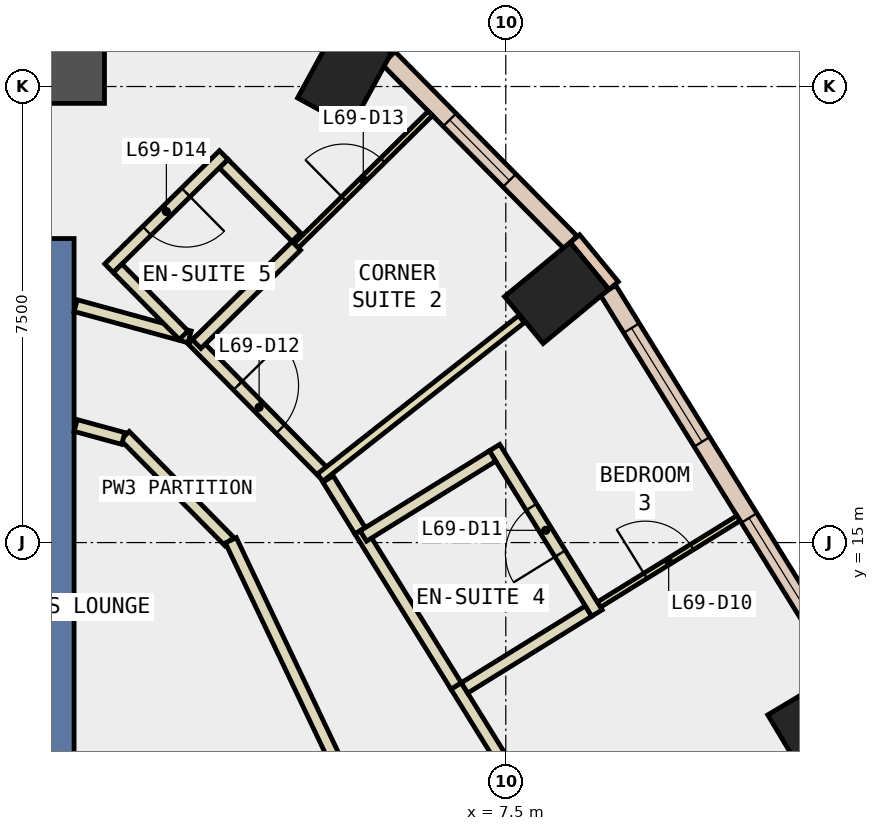
"""IFC4 building model, lengths in metres.
Left out: names, types, materials, properties, quantities, classifications, styles, units other than length and angle.
Written with IfcOpenShell. Run it as: python <this file> out.ifc"""

import sys

from ifc_helpers import new_model, si_unit, direction, frame, frame_2d, origin, origin_2d, place, context, subcontext, project, spatial, rectangle, extrude, element, fill, save


model = new_model("IFC4")
c1 = context("Model", 3, precision=1e-05, world=origin(), true_north=direction((0.0, 1.0)))
c2 = subcontext(c1, "Body", "Model", "MODEL_VIEW")
j1 = project(units=[si_unit("LENGTHUNIT", "METRE"), si_unit("PLANEANGLEUNIT", "RADIAN")], contexts=[c1])
p1 = place(None, origin())
s1 = spatial("IfcSite", under=j1, at=p1, CompositionType="ELEMENT")
p2 = place(p1, origin())
s2 = spatial("IfcBuilding", under=s1, at=p2, CompositionType="ELEMENT")
p3 = place(p2, frame((0.0, 0.0, 297.2)))
s3 = spatial("IfcBuildingStorey", under=s2, at=p3, CompositionType="ELEMENT", Elevation=297.2)
for number, where, z_axis, x_axis in (
    (1, (12.666, 12.097, -0.34), (0.0, 0.0, 1.0), (-0.514, 0.858, 0.0)),
    (2, (8.337, 19.105, -0.34), (0.0, 0.0, 1.0), (-0.636, 0.772, 0.0)),
    (3, (4.85, 22.687, -0.34), (0.0, 0.0, 1.0), (-0.878, 0.479, 0.0)),
):
    element("IfcColumn", number, at=place(p3, frame(where, z_axis=z_axis, x_axis=x_axis)), inside=s3, PredefinedType="COLUMN", context=c2, shape_type="SweptSolid", body=[
        extrude(rectangle(XDim=1.0, YDim=1.4, at=origin_2d()), origin(), (0.0, 0.0, 1.0), 3.6),
    ])
p4 = place(p3, frame((0.0, 23.123, -0.34), z_axis=(0.0, 0.0, 1.0), x_axis=(0.0, 1.0, 0.0)))
e4 = element("IfcColumn", 4, at=p4, inside=s3, PredefinedType="COLUMN", context=c2, shape_type="SweptSolid", body=[
    extrude(rectangle(XDim=1.8, YDim=1.8, at=origin_2d()), origin(), (0.0, 0.0, 1.0), 3.6),
])
p5 = place(p3, frame((0.0, 11.0, -0.34), z_axis=(0.0, 0.0, 1.0), x_axis=(0.0, 1.0, 0.0)))
e5 = element("IfcWall", 5, at=p5, inside=s3, PredefinedType="SHEAR", context=c2, shape_type="SweptSolid", body=[
    extrude(rectangle(XDim=9.0, YDim=0.8, at=frame_2d((4.5, 0.0))), origin(), (0.0, 0.0, 1.0), 3.6),
])
p6 = place(p3, frame((9.273, 19.227, 0.0), z_axis=(0.0, 0.0, 1.0), x_axis=(-0.635852688617, 0.771810441999, 0.0)))
e6 = element("IfcWall", 6, at=p6, inside=s3, PredefinedType="STANDARD", context=c2, shape_type="SweptSolid", body=[
    extrude(rectangle(XDim=1.0, YDim=0.2, at=frame_2d((0.5, 0.0))), origin(), (0.0, 0.0, 1.0), 3.26),
])
p7 = place(p3, frame((13.047, 12.907, 0.0), z_axis=(0.0, 0.0, 1.0), x_axis=(-0.526409529565, 0.850231149267, 0.0)))
e7 = element("IfcWall", 7, at=p7, inside=s3, PredefinedType="STANDARD", context=c2, shape_type="SweptSolid", body=[
    extrude(rectangle(XDim=7.346, YDim=0.3, at=frame_2d((3.673, 0.0))), origin(), (0.0, 0.0, 1.0), 3.26),
])
p8 = place(p7, frame((0.737, 0.0, 0.9)))
e8 = element("IfcOpeningElement", 8, at=p8, cuts=e7, PredefinedType="OPENING", context=c2, shape_type="SweptSolid", body=[
    extrude(rectangle(XDim=2.2, YDim=2.0, at=frame_2d((1.1, 1.0))), frame((0.0, 0.16, 0.0), z_axis=(0.0, -1.0, 0.0), x_axis=(1.0, 0.0, 0.0)), (0.0, 0.0, 1.0), 0.32),
])
p9 = place(p7, frame((4.41, 0.0, 0.9)))
e9 = element("IfcOpeningElement", 9, at=p9, cuts=e7, PredefinedType="OPENING", context=c2, shape_type="SweptSolid", body=[
    extrude(rectangle(XDim=2.2, YDim=2.0, at=frame_2d((1.1, 1.0))), frame((0.0, 0.16, 0.0), z_axis=(0.0, -1.0, 0.0), x_axis=(1.0, 0.0, 0.0)), (0.0, 0.0, 1.0), 0.32),
])
p10 = place(p3, frame((8.564, 19.938, 0.0), z_axis=(0.0, 0.0, 1.0), x_axis=(-0.70250598769, 0.711677832491, 0.0)))
e10 = element("IfcWall", 10, at=p10, inside=s3, PredefinedType="STANDARD", context=c2, shape_type="SweptSolid", body=[
    extrude(rectangle(XDim=4.259, YDim=0.3, at=frame_2d((2.129, 0.0))), origin(), (0.0, 0.0, 1.0), 3.26),
])
p11 = place(p10, frame((1.429, 0.0, 0.9)))
e11 = element("IfcOpeningElement", 11, at=p11, cuts=e10, PredefinedType="OPENING", context=c2, shape_type="SweptSolid", body=[
    extrude(rectangle(XDim=1.4, YDim=2.0, at=frame_2d((0.7, 1.0))), frame((0.0, 0.16, 0.0), z_axis=(0.0, -1.0, 0.0), x_axis=(1.0, 0.0, 0.0)), (0.0, 0.0, 1.0), 0.32),
])
p12 = place(p3, frame((2.951, 15.019, 0.0), z_axis=(0.0, 0.0, 1.0), x_axis=(-0.702341227034, 0.711840432126, 0.0)))
e12 = element("IfcWall", 12, at=p12, inside=s3, PredefinedType="PARTITIONING", context=c2, shape_type="SweptSolid", body=[
    extrude(rectangle(XDim=2.442, YDim=0.2, at=frame_2d((1.221, 0.0))), origin(), (0.0, 0.0, 1.0), 3.26),
])
p13 = place(p3, frame((1.209, 16.712, 0.0), z_axis=(0.0, 0.0, 1.0), x_axis=(-0.964583129746, 0.26377904733, 0.0)))
e13 = element("IfcWall", 13, at=p13, inside=s3, PredefinedType="PARTITIONING", context=c2, shape_type="SweptSolid", body=[
    extrude(rectangle(XDim=0.812, YDim=0.2, at=frame_2d((0.406, 0.0))), origin(), (0.0, 0.0, 1.0), 3.26),
])
p14 = place(p3, frame((6.683, 12.642, 0.0), z_axis=(0.0, 0.0, 1.0), x_axis=(0.526290465295, -0.850304854825, 0.0)))
e14 = element("IfcWall", 14, at=p14, inside=s3, PredefinedType="PARTITIONING", context=c2, shape_type="SweptSolid", body=[
    extrude(rectangle(XDim=3.538, YDim=0.2, at=frame_2d((1.769, 0.0))), origin(), (0.0, 0.0, 1.0), 3.26),
])
p15 = place(p3, frame((4.577, 16.045, 0.0), z_axis=(0.0, 0.0, 1.0), x_axis=(0.526203576349, -0.850358628014, 0.0)))
e15 = element("IfcWall", 15, at=p15, inside=s3, PredefinedType="PARTITIONING", context=c2, shape_type="SweptSolid", body=[
    extrude(rectangle(XDim=1.002, YDim=0.2, at=frame_2d((0.501, 0.0))), origin(), (0.0, 0.0, 1.0), 3.26),
])
p16 = place(p3, frame((5.104, 15.193, 0.0), z_axis=(0.0, 0.0, 1.0), x_axis=(0.526329401671, -0.850280754184, 0.0)))
e16 = element("IfcWall", 16, at=p16, inside=s3, PredefinedType="PARTITIONING", context=c2, shape_type="SweptSolid", body=[
    extrude(rectangle(XDim=3.0, YDim=0.2, at=frame_2d((1.5, 0.0))), origin(), (0.0, 0.0, 1.0), 3.26),
])
p17 = place(p3, frame((2.346, 18.336, 0.0), z_axis=(0.0, 0.0, 1.0), x_axis=(0.702481985573, -0.711701524479, 0.0)))
e17 = element("IfcWall", 17, at=p17, inside=s3, PredefinedType="PARTITIONING", context=c2, shape_type="SweptSolid", body=[
    extrude(rectangle(XDim=3.125, YDim=0.2, at=frame_2d((1.562, 0.0))), origin(), (0.0, 0.0, 1.0), 3.26),
])
p18 = place(p17, frame((1.062, 0.0, 0.0)))
e18 = element("IfcOpeningElement", 18, at=p18, cuts=e17, PredefinedType="OPENING", context=c2, shape_type="SweptSolid", body=[
    extrude(rectangle(XDim=1.0, YDim=2.1, at=frame_2d((0.5, 1.05))), frame((0.0, 0.11, 0.0), z_axis=(0.0, -1.0, 0.0), x_axis=(1.0, 0.0, 0.0)), (0.0, 0.0, 1.0), 0.22),
])
p19 = place(p3, frame((0.426, 18.896, 0.0), z_axis=(0.0, 0.0, 1.0), x_axis=(0.964522741234, -0.263999775838, 0.0)))
e19 = element("IfcWall", 19, at=p19, inside=s3, PredefinedType="PARTITIONING", context=c2, shape_type="SweptSolid", body=[
    extrude(rectangle(XDim=1.943, YDim=0.2, at=frame_2d((0.971, 0.0))), origin(), (0.0, 0.0, 1.0), 3.26),
])
p20 = place(p3, frame((9.031, 13.979, 0.0), z_axis=(0.0, 0.0, 1.0), x_axis=(0.85032680557, 0.526254998768, 0.0)))
e20 = element("IfcWall", 20, at=p20, inside=s3, PredefinedType="PARTITIONING", context=c2, shape_type="SweptSolid", body=[
    extrude(rectangle(XDim=2.7, YDim=0.1, at=frame_2d((1.35, 0.0))), origin(), (0.0, 0.0, 1.0), 3.26),
])
p21 = place(p20, frame((0.9, 0.0, 0.0)))
e21 = element("IfcOpeningElement", 21, at=p21, cuts=e20, PredefinedType="OPENING", context=c2, shape_type="SweptSolid", body=[
    extrude(rectangle(XDim=0.9, YDim=2.1, at=frame_2d((0.45, 1.05))), frame((0.0, 0.06, 0.0), z_axis=(0.0, -1.0, 0.0), x_axis=(1.0, 0.0, 0.0)), (0.0, 0.0, 1.0), 0.12),
])
p22 = place(p3, frame((6.821, 12.61, 0.0), z_axis=(0.0, 0.0, 1.0), x_axis=(0.850254303895, 0.526372129494, 0.0)))
e22 = element("IfcWall", 22, at=p22, inside=s3, PredefinedType="PARTITIONING", context=c2, shape_type="SweptSolid", body=[
    extrude(rectangle(XDim=2.399, YDim=0.2, at=frame_2d((1.2, 0.0))), origin(), (0.0, 0.0, 1.0), 3.26),
])
p23 = place(p3, frame((8.999, 13.841, 0.0), z_axis=(0.0, 0.0, 1.0), x_axis=(-0.526283695852, 0.850309044689, 0.0)))
e23 = element("IfcWall", 23, at=p23, inside=s3, PredefinedType="PARTITIONING", context=c2, shape_type="SweptSolid", body=[
    extrude(rectangle(XDim=3.2, YDim=0.2, at=frame_2d((1.6, 0.0))), origin(), (0.0, 0.0, 1.0), 3.26),
])
p24 = place(p23, frame((1.15, 0.0, 0.0)))
e24 = element("IfcOpeningElement", 24, at=p24, cuts=e23, PredefinedType="OPENING", context=c2, shape_type="SweptSolid", body=[
    extrude(rectangle(XDim=0.9, YDim=2.1, at=frame_2d((0.45, 1.05))), frame((0.0, 0.11, 0.0), z_axis=(0.0, -1.0, 0.0), x_axis=(1.0, 0.0, 0.0)), (0.0, 0.0, 1.0), 0.22),
])
p25 = place(p3, frame((7.282, 16.424, 0.0), z_axis=(0.0, 0.0, 1.0), x_axis=(-0.850142312258, -0.526552987751, 0.0)))
e25 = element("IfcWall", 25, at=p25, inside=s3, PredefinedType="PARTITIONING", context=c2, shape_type="SweptSolid", body=[
    extrude(rectangle(XDim=2.5, YDim=0.2, at=frame_2d((1.25, 0.0))), origin(), (0.0, 0.0, 1.0), 3.26),
])
p26 = place(p3, frame((4.445, 16.068, 0.0), z_axis=(0.0, 0.0, 1.0), x_axis=(0.785872006963, 0.618389188677, 0.0)))
e26 = element("IfcWall", 26, at=p26, inside=s3, PredefinedType="PARTITIONING", context=c2, shape_type="SweptSolid", body=[
    extrude(rectangle(XDim=4.216, YDim=0.15, at=frame_2d((2.108, 0.0))), origin(), (0.0, 0.0, 1.0), 3.26),
])
p27 = place(p3, frame((4.053, 19.881, 0.0), z_axis=(0.0, 0.0, 1.0), x_axis=(0.711776071152, 0.702406452516, 0.0)))
e27 = element("IfcWall", 27, at=p27, inside=s3, PredefinedType="PARTITIONING", context=c2, shape_type="SweptSolid", body=[
    extrude(rectangle(XDim=3.101, YDim=0.1, at=frame_2d((1.55, 0.0))), origin(), (0.0, 0.0, 1.0), 3.26),
])
p28 = place(p27, frame((1.1, 0.0, 0.0)))
e28 = element("IfcOpeningElement", 28, at=p28, cuts=e27, PredefinedType="OPENING", context=c2, shape_type="SweptSolid", body=[
    extrude(rectangle(XDim=0.9, YDim=2.1, at=frame_2d((0.45, 1.05))), frame((0.0, 0.06, 0.0), z_axis=(0.0, -1.0, 0.0), x_axis=(1.0, 0.0, 0.0)), (0.0, 0.0, 1.0), 0.12),
])
p29 = place(p3, frame((2.416, 18.265, 0.0), z_axis=(0.0, 0.0, 1.0), x_axis=(0.71207765541, 0.702100714047, 0.0)))
e29 = element("IfcWall", 29, at=p29, inside=s3, PredefinedType="PARTITIONING", context=c2, shape_type="SweptSolid", body=[
    extrude(rectangle(XDim=2.3, YDim=0.2, at=frame_2d((1.15, 0.0))), origin(), (0.0, 0.0, 1.0), 3.26),
])
p30 = place(p3, frame((4.054, 20.022, 0.0), z_axis=(0.0, 0.0, 1.0), x_axis=(-0.702351102688, 0.711830688123, 0.0)))
e30 = element("IfcWall", 30, at=p30, inside=s3, PredefinedType="PARTITIONING", context=c2, shape_type="SweptSolid", body=[
    extrude(rectangle(XDim=1.7, YDim=0.2, at=frame_2d((0.85, 0.0))), origin(), (0.0, 0.0, 1.0), 3.26),
])
p31 = place(p3, frame((2.861, 21.374, 0.0), z_axis=(0.0, 0.0, 1.0), x_axis=(-0.711606122075, -0.702578626934, 0.0)))
e31 = element("IfcWall", 31, at=p31, inside=s3, PredefinedType="PARTITIONING", context=c2, shape_type="SweptSolid", body=[
    extrude(rectangle(XDim=2.65, YDim=0.2, at=frame_2d((1.325, 0.0))), origin(), (0.0, 0.0, 1.0), 3.26),
])
p32 = place(p31, frame((0.875, 0.0, 0.0)))
e32 = element("IfcOpeningElement", 32, at=p32, cuts=e31, PredefinedType="OPENING", context=c2, shape_type="SweptSolid", body=[
    extrude(rectangle(XDim=0.9, YDim=2.1, at=frame_2d((0.45, 1.05))), frame((0.0, 0.11, 0.0), z_axis=(0.0, -1.0, 0.0), x_axis=(1.0, 0.0, 0.0)), (0.0, 0.0, 1.0), 0.22),
])
p33 = place(p3, frame((1.116, 19.511, 0.0), z_axis=(0.0, 0.0, 1.0), x_axis=(0.702515837086, -0.711668109896, 0.0)))
e33 = element("IfcWall", 33, at=p33, inside=s3, PredefinedType="PARTITIONING", context=c2, shape_type="SweptSolid", body=[
    extrude(rectangle(XDim=1.547, YDim=0.2, at=frame_2d((0.773, 0.0))), origin(), (0.0, 0.0, 1.0), 3.26),
])
p34 = place(p3, frame((4.822, 11.156, 0.0), z_axis=(0.0, 0.0, 1.0), x_axis=(-0.429057973289, 0.903276953961, 0.0)))
e34 = element("IfcWall", 34, at=p34, inside=s3, PredefinedType="PARTITIONING", context=c2, shape_type="SweptSolid", body=[
    extrude(rectangle(XDim=4.298, YDim=0.2, at=frame_2d((2.149, 0.0))), origin(), (0.0, 0.0, 1.0), 3.26),
])
p35 = place(p8, origin())
e35 = element("IfcWindow", 35, at=p35, inside=s3, PartitioningType="SINGLE_PANEL", PredefinedType="WINDOW", context=c2, shape_type="SweptSolid", body=[
    extrude(rectangle(XDim=2.2, YDim=2.0, at=frame_2d((1.1, 1.0))), frame((0.0, 0.03, 0.0), z_axis=(0.0, -1.0, 0.0), x_axis=(1.0, 0.0, 0.0)), (0.0, 0.0, 1.0), 0.06),
])
fill(e8, e35)
p36 = place(p9, origin())
e36 = element("IfcWindow", 36, at=p36, inside=s3, PartitioningType="SINGLE_PANEL", PredefinedType="WINDOW", context=c2, shape_type="SweptSolid", body=[
    extrude(rectangle(XDim=2.2, YDim=2.0, at=frame_2d((1.1, 1.0))), frame((0.0, 0.03, 0.0), z_axis=(0.0, -1.0, 0.0), x_axis=(1.0, 0.0, 0.0)), (0.0, 0.0, 1.0), 0.06),
])
fill(e9, e36)
p37 = place(p11, origin())
e37 = element("IfcWindow", 37, at=p37, inside=s3, PartitioningType="SINGLE_PANEL", PredefinedType="WINDOW", context=c2, shape_type="SweptSolid", body=[
    extrude(rectangle(XDim=1.4, YDim=2.0, at=frame_2d((0.7, 1.0))), frame((0.0, 0.03, 0.0), z_axis=(0.0, -1.0, 0.0), x_axis=(1.0, 0.0, 0.0)), (0.0, 0.0, 1.0), 0.06),
])
fill(e11, e37)
p38 = place(p21, origin())
e38 = element("IfcDoor", 38, at=p38, inside=s3, OperationType="SINGLE_SWING_LEFT", PredefinedType="DOOR", context=c2, shape_type="SweptSolid", body=[
    extrude(rectangle(XDim=0.9, YDim=2.1, at=frame_2d((0.45, 1.05))), frame((0.0, 0.025, 0.0), z_axis=(0.0, -1.0, 0.0), x_axis=(1.0, 0.0, 0.0)), (0.0, 0.0, 1.0), 0.05),
])
fill(e21, e38)
p39 = place(p24, origin())
e39 = element("IfcDoor", 39, at=p39, inside=s3, OperationType="SINGLE_SWING_RIGHT", PredefinedType="DOOR", context=c2, shape_type="SweptSolid", body=[
    extrude(rectangle(XDim=0.9, YDim=2.1, at=frame_2d((0.45, 1.05))), frame((0.0, 0.025, 0.0), z_axis=(0.0, -1.0, 0.0), x_axis=(1.0, 0.0, 0.0)), (0.0, 0.0, 1.0), 0.05),
])
fill(e24, e39)
p40 = place(p18, origin())
e40 = element("IfcDoor", 40, at=p40, inside=s3, OperationType="SINGLE_SWING_LEFT", PredefinedType="DOOR", context=c2, shape_type="SweptSolid", body=[
    extrude(rectangle(XDim=1.0, YDim=2.1, at=frame_2d((0.5, 1.05))), frame((0.0, 0.025, 0.0), z_axis=(0.0, -1.0, 0.0), x_axis=(1.0, 0.0, 0.0)), (0.0, 0.0, 1.0), 0.05),
])
fill(e18, e40)
p41 = place(p28, origin())
e41 = element("IfcDoor", 41, at=p41, inside=s3, OperationType="SINGLE_SWING_LEFT", PredefinedType="DOOR", context=c2, shape_type="SweptSolid", body=[
    extrude(rectangle(XDim=0.9, YDim=2.1, at=frame_2d((0.45, 1.05))), frame((0.0, 0.025, 0.0), z_axis=(0.0, -1.0, 0.0), x_axis=(1.0, 0.0, 0.0)), (0.0, 0.0, 1.0), 0.05),
])
fill(e28, e41)
p42 = place(p32, origin())
e42 = element("IfcDoor", 42, at=p42, inside=s3, OperationType="SINGLE_SWING_LEFT", PredefinedType="DOOR", context=c2, shape_type="SweptSolid", body=[
    extrude(rectangle(XDim=0.9, YDim=2.1, at=frame_2d((0.45, 1.05))), frame((0.0, 0.025, 0.0), z_axis=(0.0, -1.0, 0.0), x_axis=(1.0, 0.0, 0.0)), (0.0, 0.0, 1.0), 0.05),
])
fill(e32, e42)
save(model, sys.argv[1])
